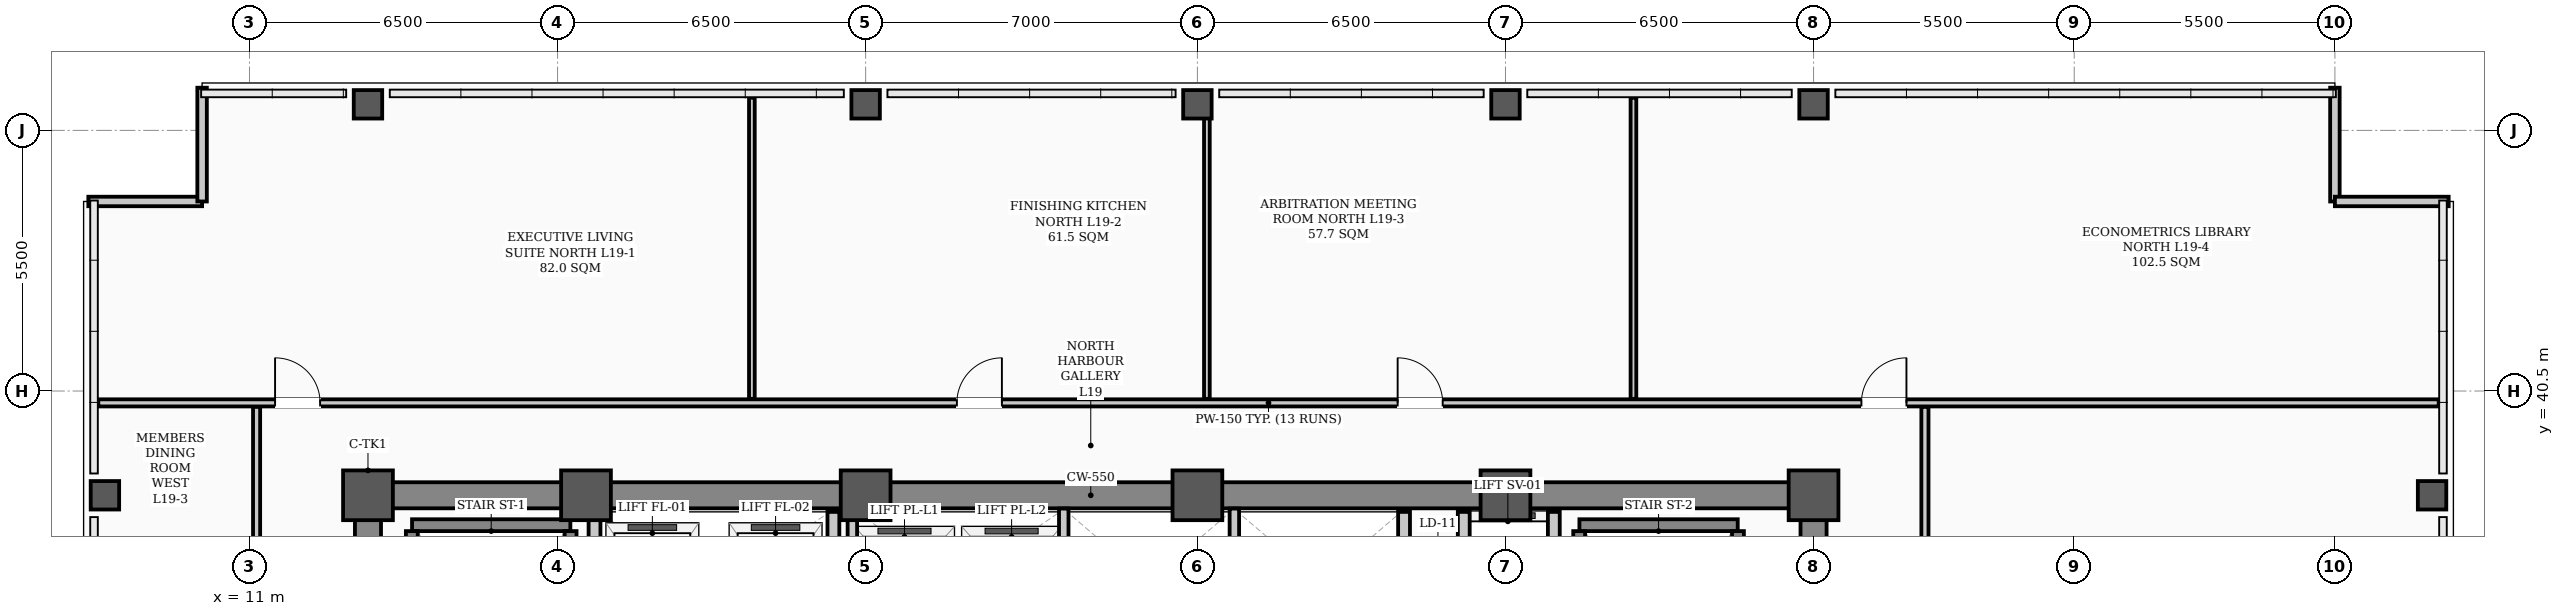
"""IFC4 building model, lengths in metres.
Left out: names, types, materials, properties, quantities, classifications, styles, units other than length and angle.
Written with IfcOpenShell. Run it as: python <this file> out.ifc"""

import sys

from ifc_helpers import new_model, si_unit, direction, frame, frame_2d, origin, origin_2d, place, context, subcontext, project, spatial, rectangle, hollow_rectangle, extrude, element, fill, save


model = new_model("IFC4")
c1 = context("Model", 3, precision=1e-05, world=origin(), true_north=direction((0.0, 1.0)))
c2 = subcontext(c1, "Body", "Model", "MODEL_VIEW")
j1 = project(units=[si_unit("LENGTHUNIT", "METRE"), si_unit("PLANEANGLEUNIT", "RADIAN")], contexts=[c1])
p1 = place(None, origin())
s1 = spatial("IfcSite", under=j1, at=p1, CompositionType="ELEMENT")
p2 = place(p1, origin())
s2 = spatial("IfcBuilding", under=s1, at=p2, CompositionType="ELEMENT")
p3 = place(p2, frame((0.0, 0.0, 77.2)))
s3 = spatial("IfcBuildingStorey", under=s2, at=p3, CompositionType="ELEMENT", Elevation=77.2)
for number, where, z_axis, x_axis in (
    (1, (13.5, 38.3, 0.0), (0.0, 0.0, 1.0), (1.0, 0.0, 0.0)),
    (2, (18.1, 38.3, 0.0), (0.0, 0.0, 1.0), (1.0, 0.0, 0.0)),
    (3, (24.0, 38.3, 0.0), (0.0, 0.0, 1.0), (1.0, 0.0, 0.0)),
    (4, (31.0, 38.3, 0.0), (0.0, 0.0, 1.0), (1.0, 0.0, 0.0)),
    (5, (37.5, 38.3, 0.0), (0.0, 0.0, 1.0), (1.0, 0.0, 0.0)),
    (6, (44.0, 38.3, 0.0), (0.0, 0.0, 1.0), (1.0, 0.0, 0.0)),
):
    element("IfcColumn", number, at=place(p3, frame(where, z_axis=z_axis, x_axis=x_axis)), inside=s3, PredefinedType="COLUMN", context=c2, shape_type="SweptSolid", body=[
        extrude(hollow_rectangle(XDim=1.05, YDim=1.05, WallThickness=0.038, InnerFilletRadius=0.019, OuterFilletRadius=0.057, at=origin_2d()), origin(), (0.0, 0.0, 1.0), 3.9),
    ])
p4 = place(p3, frame((7.95, 38.3, 0.0), z_axis=(0.0, 0.0, 1.0), x_axis=(1.0, 0.0, 0.0)))
e7 = element("IfcColumn", 7, at=p4, inside=s3, PredefinedType="COLUMN", context=c2, shape_type="SweptSolid", body=[
    extrude(hollow_rectangle(XDim=0.6, YDim=0.6, WallThickness=0.026, InnerFilletRadius=0.013, OuterFilletRadius=0.039, at=origin_2d()), origin(), (0.0, 0.0, 1.0), 3.9),
])
for number, where, z_axis, x_axis in (
    (8, (13.5, 46.55, 0.0), (0.0, 0.0, 1.0), (1.0, 0.0, 0.0)),
    (9, (24.0, 46.55, 0.0), (0.0, 0.0, 1.0), (1.0, 0.0, 0.0)),
    (10, (31.0, 46.55, 0.0), (0.0, 0.0, 1.0), (1.0, 0.0, 0.0)),
    (11, (37.5, 46.55, 0.0), (0.0, 0.0, 1.0), (1.0, 0.0, 0.0)),
    (12, (44.0, 46.55, 0.0), (0.0, 0.0, 1.0), (1.0, 0.0, 0.0)),
):
    element("IfcColumn", number, at=place(p3, frame(where, z_axis=z_axis, x_axis=x_axis)), inside=s3, PredefinedType="COLUMN", context=c2, shape_type="SweptSolid", body=[
        extrude(hollow_rectangle(XDim=0.6, YDim=0.6, WallThickness=0.026, InnerFilletRadius=0.013, OuterFilletRadius=0.039, at=origin_2d()), origin(), (0.0, 0.0, 1.0), 3.66),
    ])
p5 = place(p3, frame((57.05, 38.3, 0.0), z_axis=(0.0, 0.0, 1.0), x_axis=(1.0, 0.0, 0.0)))
e13 = element("IfcColumn", 13, at=p5, inside=s3, PredefinedType="COLUMN", context=c2, shape_type="SweptSolid", body=[
    extrude(hollow_rectangle(XDim=0.6, YDim=0.6, WallThickness=0.026, InnerFilletRadius=0.013, OuterFilletRadius=0.039, at=origin_2d()), origin(), (0.0, 0.0, 1.0), 3.9),
])
for number, where, z_axis, x_axis in (
    (14, (7.6, 44.5, 0.0), (0.0, 0.0, 1.0), (1.0, 0.0, 0.0)),
    (15, (10.0, 44.5, 0.0), (0.0, 0.0, 1.0), (0.0, 1.0, 0.0)),
    (16, (55.0, 46.9, 0.0), (0.0, 0.0, 1.0), (0.0, -1.0, 0.0)),
    (17, (55.0, 44.5, 0.0), (0.0, 0.0, 1.0), (1.0, 0.0, 0.0)),
):
    element("IfcWall", number, at=place(p3, frame(where, z_axis=z_axis, x_axis=x_axis)), inside=s3, PredefinedType="PARAPET", context=c2, shape_type="SweptSolid", body=[
        extrude(rectangle(XDim=2.4, YDim=0.2, at=frame_2d((1.2, 0.0))), origin(), (0.0, 0.0, 1.0), 1.2),
    ])
p6 = place(p3, frame((13.5, 38.3, 0.0), z_axis=(0.0, 0.0, 1.0), x_axis=(1.0, 0.0, 0.0)))
e18 = element("IfcWall", 18, at=p6, inside=s3, PredefinedType="SHEAR", context=c2, shape_type="SweptSolid", body=[
    extrude(rectangle(XDim=30.5, YDim=0.55, at=frame_2d((15.25, 0.0))), origin(), (0.0, 0.0, 1.0), 3.66),
])
for number, where, z_axis, x_axis in (
    (19, (13.5, 29.35, 0.0), (0.0, 0.0, 1.0), (0.0, 1.0, 0.0)),
    (20, (44.0, 29.35, 0.0), (0.0, 0.0, 1.0), (0.0, 1.0, 0.0)),
):
    element("IfcWall", number, at=place(p3, frame(where, z_axis=z_axis, x_axis=x_axis)), inside=s3, PredefinedType="SHEAR", context=c2, shape_type="SweptSolid", body=[
        extrude(rectangle(XDim=8.6, YDim=0.55, at=frame_2d((4.3, 0.0))), origin(), (0.0, 0.0, 1.0), 3.66),
    ])
p7 = place(p3, frame((14.43, 37.669, 0.0), z_axis=(0.0, 0.0, 1.0), x_axis=(1.0, 0.0, 0.0)))
e21 = element("IfcWall", 21, at=p7, inside=s3, PredefinedType="STANDARD", context=c2, shape_type="SweptSolid", body=[
    extrude(rectangle(XDim=3.34, YDim=0.25, at=frame_2d((1.67, 0.0))), origin(), (0.0, 0.0, 1.0), 3.66),
])
for number, where, z_axis, x_axis in (
    (22, (14.425, 30.36, 0.0), (0.0, 0.0, 1.0), (0.0, 1.0, 0.0)),
    (23, (17.775, 30.36, 0.0), (0.0, 0.0, 1.0), (0.0, 1.0, 0.0)),
):
    element("IfcWall", number, at=place(p3, frame(where, z_axis=z_axis, x_axis=x_axis)), inside=s3, PredefinedType="STANDARD", context=c2, shape_type="SweptSolid", body=[
        extrude(rectangle(XDim=7.184, YDim=0.25, at=frame_2d((3.592, 0.0))), origin(), (0.0, 0.0, 1.0), 3.66),
    ])
p8 = place(p3, frame((39.06, 37.669, 0.0), z_axis=(0.0, 0.0, 1.0), x_axis=(1.0, 0.0, 0.0)))
e24 = element("IfcWall", 24, at=p8, inside=s3, PredefinedType="STANDARD", context=c2, shape_type="SweptSolid", body=[
    extrude(rectangle(XDim=3.34, YDim=0.25, at=frame_2d((1.67, 0.0))), origin(), (0.0, 0.0, 1.0), 3.66),
])
for number, where, z_axis, x_axis in (
    (25, (39.055, 30.36, 0.0), (0.0, 0.0, 1.0), (0.0, 1.0, 0.0)),
    (26, (42.405, 30.36, 0.0), (0.0, 0.0, 1.0), (0.0, 1.0, 0.0)),
):
    element("IfcWall", number, at=place(p3, frame(where, z_axis=z_axis, x_axis=x_axis)), inside=s3, PredefinedType="STANDARD", context=c2, shape_type="SweptSolid", body=[
        extrude(rectangle(XDim=7.184, YDim=0.25, at=frame_2d((3.592, 0.0))), origin(), (0.0, 0.0, 1.0), 3.66),
    ])
p9 = place(p3, frame((36.62, 31.95, 0.0), z_axis=(0.0, 0.0, 1.0), x_axis=(0.0, 1.0, 0.0)))
e27 = element("IfcWall", 27, at=p9, inside=s3, PredefinedType="STANDARD", context=c2, shape_type="SweptSolid", body=[
    extrude(rectangle(XDim=6.0, YDim=0.25, at=frame_2d((3.0, 0.0))), origin(), (0.0, 0.0, 1.0), 2.24),
])
p10 = place(p9, frame((0.9, 0.0, 0.0)))
e28 = element("IfcOpeningElement", 28, at=p10, cuts=e27, PredefinedType="OPENING", context=c2, shape_type="SweptSolid", body=[
    extrude(rectangle(XDim=1.1, YDim=2.08, at=frame_2d((0.55, 1.04))), frame((0.0, 0.135, 0.0), z_axis=(0.0, -1.0, 0.0), x_axis=(1.0, 0.0, 0.0)), (0.0, 0.0, 1.0), 0.27),
])
p11 = place(p9, frame((4.0, 0.0, 0.0)))
e29 = element("IfcOpeningElement", 29, at=p11, cuts=e27, PredefinedType="OPENING", context=c2, shape_type="SweptSolid", body=[
    extrude(rectangle(XDim=1.1, YDim=2.08, at=frame_2d((0.55, 1.04))), frame((0.0, 0.135, 0.0), z_axis=(0.0, -1.0, 0.0), x_axis=(1.0, 0.0, 0.0)), (0.0, 0.0, 1.0), 0.27),
])
p12 = place(p3, frame((38.52, 31.95, 0.0), z_axis=(0.0, 0.0, 1.0), x_axis=(0.0, 1.0, 0.0)))
e30 = element("IfcWall", 30, at=p12, inside=s3, PredefinedType="STANDARD", context=c2, shape_type="SweptSolid", body=[
    extrude(rectangle(XDim=6.0, YDim=0.25, at=frame_2d((3.0, 0.0))), origin(), (0.0, 0.0, 1.0), 2.24),
])
for number, where, z_axis, x_axis in (
    (31, (18.28, 34.62, 0.0), (0.0, 0.0, 1.0), (0.0, 1.0, 0.0)),
    (32, (23.32, 34.62, 0.0), (0.0, 0.0, 1.0), (0.0, 1.0, 0.0)),
):
    element("IfcWall", number, at=place(p3, frame(where, z_axis=z_axis, x_axis=x_axis)), inside=s3, PredefinedType="STANDARD", context=c2, shape_type="SweptSolid", body=[
        extrude(rectangle(XDim=3.33, YDim=0.25, at=frame_2d((1.665, 0.0))), origin(), (0.0, 0.0, 1.0), 2.24),
    ])
p13 = place(p3, frame((35.36, 34.9, 0.0), z_axis=(0.0, 0.0, 1.0), x_axis=(0.0, 1.0, 0.0)))
e33 = element("IfcWall", 33, at=p13, inside=s3, PredefinedType="STANDARD", context=c2, shape_type="SweptSolid", body=[
    extrude(rectangle(XDim=3.05, YDim=0.25, at=frame_2d((1.525, 0.0))), origin(), (0.0, 0.0, 1.0), 2.24),
])
p14 = place(p3, frame((7.81, 40.25, 0.0), z_axis=(0.0, 0.0, 1.0), x_axis=(1.0, 0.0, 0.0)))
e34 = element("IfcWall", 34, at=p14, inside=s3, PredefinedType="PARTITIONING", context=c2, shape_type="SweptSolid", body=[
    extrude(rectangle(XDim=49.38, YDim=0.15, at=frame_2d((24.69, 0.0))), origin(), (0.0, 0.0, 1.0), 2.24),
])
p15 = place(p14, frame((3.73, 0.0, 0.0)))
e35 = element("IfcOpeningElement", 35, at=p15, cuts=e34, PredefinedType="OPENING", context=c2, shape_type="SweptSolid", body=[
    extrude(rectangle(XDim=0.95, YDim=2.08, at=frame_2d((0.475, 1.04))), frame((0.0, 0.085, 0.0), z_axis=(0.0, -1.0, 0.0), x_axis=(1.0, 0.0, 0.0)), (0.0, 0.0, 1.0), 0.17),
])
p16 = place(p14, frame((18.115, 0.0, 0.0)))
e36 = element("IfcOpeningElement", 36, at=p16, cuts=e34, PredefinedType="OPENING", context=c2, shape_type="SweptSolid", body=[
    extrude(rectangle(XDim=0.95, YDim=2.08, at=frame_2d((0.475, 1.04))), frame((0.0, 0.085, 0.0), z_axis=(0.0, -1.0, 0.0), x_axis=(1.0, 0.0, 0.0)), (0.0, 0.0, 1.0), 0.17),
])
p17 = place(p14, frame((27.415, 0.0, 0.0)))
e37 = element("IfcOpeningElement", 37, at=p17, cuts=e34, PredefinedType="OPENING", context=c2, shape_type="SweptSolid", body=[
    extrude(rectangle(XDim=0.95, YDim=2.08, at=frame_2d((0.475, 1.04))), frame((0.0, 0.085, 0.0), z_axis=(0.0, -1.0, 0.0), x_axis=(1.0, 0.0, 0.0)), (0.0, 0.0, 1.0), 0.17),
])
p18 = place(p14, frame((37.2, 0.0, 0.0)))
e38 = element("IfcOpeningElement", 38, at=p18, cuts=e34, PredefinedType="OPENING", context=c2, shape_type="SweptSolid", body=[
    extrude(rectangle(XDim=0.95, YDim=2.08, at=frame_2d((0.475, 1.04))), frame((0.0, 0.085, 0.0), z_axis=(0.0, -1.0, 0.0), x_axis=(1.0, 0.0, 0.0)), (0.0, 0.0, 1.0), 0.17),
])
p19 = place(p3, frame((11.15, 17.635, 0.0), z_axis=(0.0, 0.0, 1.0), x_axis=(0.0, 1.0, 0.0)))
e39 = element("IfcWall", 39, at=p19, inside=s3, PredefinedType="PARTITIONING", context=c2, shape_type="SweptSolid", body=[
    extrude(rectangle(XDim=22.53, YDim=0.15, at=frame_2d((11.265, 0.0))), origin(), (0.0, 0.0, 1.0), 2.24),
])
p20 = place(p19, frame((3.865, 0.0, 0.0)))
e40 = element("IfcOpeningElement", 40, at=p20, cuts=e39, PredefinedType="OPENING", context=c2, shape_type="SweptSolid", body=[
    extrude(rectangle(XDim=0.95, YDim=2.08, at=frame_2d((0.475, 1.04))), frame((0.0, 0.085, 0.0), z_axis=(0.0, -1.0, 0.0), x_axis=(1.0, 0.0, 0.0)), (0.0, 0.0, 1.0), 0.17),
])
p21 = place(p19, frame((9.49, 0.0, 0.0)))
e41 = element("IfcOpeningElement", 41, at=p21, cuts=e39, PredefinedType="OPENING", context=c2, shape_type="SweptSolid", body=[
    extrude(rectangle(XDim=0.95, YDim=2.08, at=frame_2d((0.475, 1.04))), frame((0.0, 0.085, 0.0), z_axis=(0.0, -1.0, 0.0), x_axis=(1.0, 0.0, 0.0)), (0.0, 0.0, 1.0), 0.17),
])
p22 = place(p19, frame((18.415, 0.0, 0.0)))
e42 = element("IfcOpeningElement", 42, at=p22, cuts=e39, PredefinedType="OPENING", context=c2, shape_type="SweptSolid", body=[
    extrude(rectangle(XDim=0.95, YDim=2.08, at=frame_2d((0.475, 1.04))), frame((0.0, 0.085, 0.0), z_axis=(0.0, -1.0, 0.0), x_axis=(1.0, 0.0, 0.0)), (0.0, 0.0, 1.0), 0.17),
])
p23 = place(p3, frame((46.35, 17.635, 0.0), z_axis=(0.0, 0.0, 1.0), x_axis=(0.0, 1.0, 0.0)))
e43 = element("IfcWall", 43, at=p23, inside=s3, PredefinedType="PARTITIONING", context=c2, shape_type="SweptSolid", body=[
    extrude(rectangle(XDim=22.53, YDim=0.15, at=frame_2d((11.265, 0.0))), origin(), (0.0, 0.0, 1.0), 2.24),
])
p24 = place(p23, frame((3.865, 0.0, 0.0)))
e44 = element("IfcOpeningElement", 44, at=p24, cuts=e43, PredefinedType="OPENING", context=c2, shape_type="SweptSolid", body=[
    extrude(rectangle(XDim=0.95, YDim=2.08, at=frame_2d((0.475, 1.04))), frame((0.0, 0.085, 0.0), z_axis=(0.0, -1.0, 0.0), x_axis=(1.0, 0.0, 0.0)), (0.0, 0.0, 1.0), 0.17),
])
p25 = place(p23, frame((9.49, 0.0, 0.0)))
e45 = element("IfcOpeningElement", 45, at=p25, cuts=e43, PredefinedType="OPENING", context=c2, shape_type="SweptSolid", body=[
    extrude(rectangle(XDim=0.95, YDim=2.08, at=frame_2d((0.475, 1.04))), frame((0.0, 0.085, 0.0), z_axis=(0.0, -1.0, 0.0), x_axis=(1.0, 0.0, 0.0)), (0.0, 0.0, 1.0), 0.17),
])
p26 = place(p23, frame((18.415, 0.0, 0.0)))
e46 = element("IfcOpeningElement", 46, at=p26, cuts=e43, PredefinedType="OPENING", context=c2, shape_type="SweptSolid", body=[
    extrude(rectangle(XDim=0.95, YDim=2.08, at=frame_2d((0.475, 1.04))), frame((0.0, 0.085, 0.0), z_axis=(0.0, -1.0, 0.0), x_axis=(1.0, 0.0, 0.0)), (0.0, 0.0, 1.0), 0.17),
])
for number, where, z_axis, x_axis in (
    (47, (21.6, 40.335, 0.0), (0.0, 0.0, 1.0), (0.0, 1.0, 0.0)),
    (48, (31.2, 40.335, 0.0), (0.0, 0.0, 1.0), (0.0, 1.0, 0.0)),
    (49, (40.2, 40.335, 0.0), (0.0, 0.0, 1.0), (0.0, 1.0, 0.0)),
):
    element("IfcWall", number, at=place(p3, frame(where, z_axis=z_axis, x_axis=x_axis)), inside=s3, PredefinedType="PARTITIONING", context=c2, shape_type="SweptSolid", body=[
        extrude(rectangle(XDim=6.355, YDim=0.12, at=frame_2d((3.177, 0.0))), origin(), (0.0, 0.0, 1.0), 2.24),
    ])
for number, where, z_axis, x_axis in (
    (50, (23.72, 34.9, 0.0), (0.0, 0.0, 1.0), (0.0, 1.0, 0.0)),
    (51, (28.18, 34.9, 0.0), (0.0, 0.0, 1.0), (0.0, 1.0, 0.0)),
    (52, (31.78, 34.9, 0.0), (0.0, 0.0, 1.0), (0.0, 1.0, 0.0)),
):
    element("IfcWall", number, at=place(p3, frame(where, z_axis=z_axis, x_axis=x_axis)), inside=s3, PredefinedType="STANDARD", context=c2, shape_type="SweptSolid", body=[
        extrude(rectangle(XDim=3.12, YDim=0.2, at=frame_2d((1.56, 0.0))), origin(), (0.0, 0.0, 1.0), 2.24),
    ])
p27 = place(p15, origin())
e53 = element("IfcDoor", 53, at=p27, inside=s3, OperationType="SINGLE_SWING_LEFT", PredefinedType="DOOR", context=c2, shape_type="SweptSolid", body=[
    extrude(rectangle(XDim=0.95, YDim=2.08, at=frame_2d((0.475, 1.04))), frame((0.0, 0.025, 0.0), z_axis=(0.0, -1.0, 0.0), x_axis=(1.0, 0.0, 0.0)), (0.0, 0.0, 1.0), 0.05),
])
fill(e35, e53)
p28 = place(p16, origin())
e54 = element("IfcDoor", 54, at=p28, inside=s3, OperationType="SINGLE_SWING_RIGHT", PredefinedType="DOOR", context=c2, shape_type="SweptSolid", body=[
    extrude(rectangle(XDim=0.95, YDim=2.08, at=frame_2d((0.475, 1.04))), frame((0.0, 0.025, 0.0), z_axis=(0.0, -1.0, 0.0), x_axis=(1.0, 0.0, 0.0)), (0.0, 0.0, 1.0), 0.05),
])
fill(e36, e54)
p29 = place(p17, origin())
e55 = element("IfcDoor", 55, at=p29, inside=s3, OperationType="SINGLE_SWING_LEFT", PredefinedType="DOOR", context=c2, shape_type="SweptSolid", body=[
    extrude(rectangle(XDim=0.95, YDim=2.08, at=frame_2d((0.475, 1.04))), frame((0.0, 0.025, 0.0), z_axis=(0.0, -1.0, 0.0), x_axis=(1.0, 0.0, 0.0)), (0.0, 0.0, 1.0), 0.05),
])
fill(e37, e55)
p30 = place(p18, origin())
e56 = element("IfcDoor", 56, at=p30, inside=s3, OperationType="SINGLE_SWING_RIGHT", PredefinedType="DOOR", context=c2, shape_type="SweptSolid", body=[
    extrude(rectangle(XDim=0.95, YDim=2.08, at=frame_2d((0.475, 1.04))), frame((0.0, 0.025, 0.0), z_axis=(0.0, -1.0, 0.0), x_axis=(1.0, 0.0, 0.0)), (0.0, 0.0, 1.0), 0.05),
])
fill(e38, e56)
save(model, sys.argv[1])
